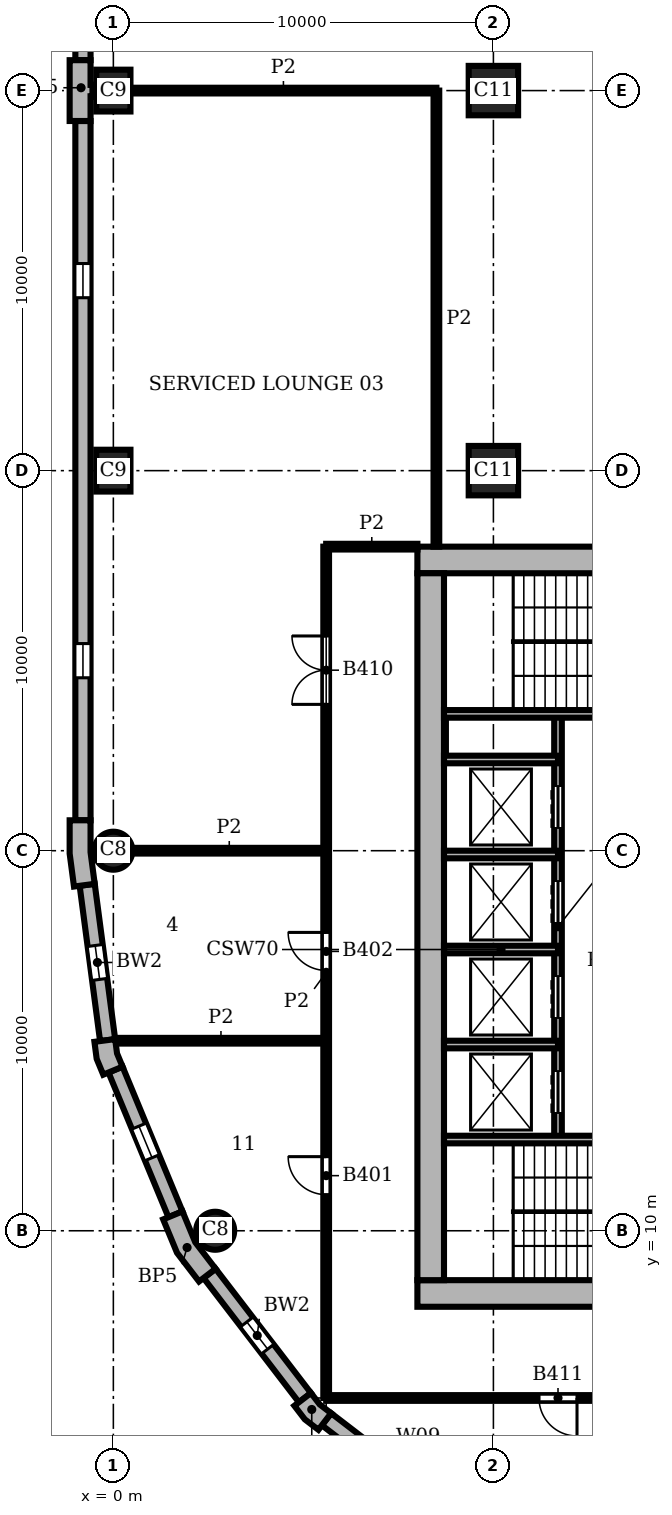
"""IFC4 building model, lengths in metres.
Left out: names, types, materials, properties, quantities, classifications, styles, units other than length and angle.
Written with IfcOpenShell. Run it as: python <this file> out.ifc"""

import sys

from ifc_helpers import new_model, si_unit, direction, frame, frame_2d, origin, origin_2d, place, context, subcontext, project, spatial, polyline, rectangle, circle, outline, extrude, element, fill, save


model = new_model("IFC4")
c1 = context("Model", 3, precision=1e-05, world=origin(), true_north=direction((0.0, 1.0)))
c2 = subcontext(c1, "Body", "Model", "MODEL_VIEW")
j1 = project(units=[si_unit("LENGTHUNIT", "METRE"), si_unit("PLANEANGLEUNIT", "RADIAN")], contexts=[c1])
p1 = place(None, origin())
s1 = spatial("IfcSite", under=j1, at=p1, CompositionType="ELEMENT")
p2 = place(p1, origin())
s2 = spatial("IfcBuilding", under=s1, at=p2, CompositionType="ELEMENT")
p3 = place(p2, frame((0.0, 0.0, 166.8)))
s3 = spatial("IfcBuildingStorey", under=s2, at=p3, CompositionType="ELEMENT", Elevation=166.8)
for number, where, z_axis, x_axis in (
    (1, (0.0, 40.0, 0.0), (0.0, 0.0, 1.0), (0.0, 1.0, 0.0)),
    (2, (0.0, 30.0, 0.0), (0.0, 0.0, 1.0), (0.0, 1.0, 0.0)),
):
    element("IfcColumn", number, at=place(p3, frame(where, z_axis=z_axis, x_axis=x_axis)), inside=s3, PredefinedType="COLUMN", context=c2, shape_type="SweptSolid", body=[
        extrude(rectangle(XDim=1.1, YDim=0.9, at=origin_2d()), origin(), (0.0, 0.0, 1.0), 3.9),
    ])
for number, where, z_axis, x_axis in (
    (3, (0.0, 20.0, 0.0), (0.0, 0.0, 1.0), (1.0, 0.0, 0.0)),
    (4, (2.679, 10.0, 0.0), (0.0, 0.0, 1.0), (1.0, 0.0, 0.0)),
):
    element("IfcColumn", number, at=place(p3, frame(where, z_axis=z_axis, x_axis=x_axis)), inside=s3, PredefinedType="COLUMN", context=c2, shape_type="SweptSolid", body=[
        extrude(circle(Radius=0.5, at=origin_2d()), origin(), (0.0, 0.0, 1.0), 3.9),
    ])
for number, where, z_axis, x_axis in (
    (5, (10.0, 30.0, 0.0), (0.0, 0.0, 1.0), (1.0, 0.0, 0.0)),
    (6, (10.0, 40.0, 0.0), (0.0, 0.0, 1.0), (1.0, 0.0, 0.0)),
):
    element("IfcColumn", number, at=place(p3, frame(where, z_axis=z_axis, x_axis=x_axis)), inside=s3, PredefinedType="COLUMN", context=c2, shape_type="SweptSolid", body=[
        extrude(rectangle(XDim=1.3, YDim=1.3, at=origin_2d()), origin(), (0.0, 0.0, 1.0), 3.9),
    ])
for number, where, z_axis, x_axis in (
    (7, (8.0, 8.35, 0.0), (0.0, 0.0, 1.0), (1.0, 0.0, 0.0)),
    (8, (28.0, 27.65, 0.0), (0.0, 0.0, 1.0), (-1.0, 0.0, 0.0)),
):
    element("IfcWall", number, at=place(p3, frame(where, z_axis=z_axis, x_axis=x_axis)), inside=s3, PredefinedType="SHEAR", context=c2, shape_type="SweptSolid", body=[
        extrude(rectangle(XDim=20.0, YDim=0.7, at=frame_2d((10.0, 0.0))), origin(), (0.0, 0.0, 1.0), 3.9),
    ])
p4 = place(p3, frame((8.35, 27.3, 0.0), z_axis=(0.0, 0.0, 1.0), x_axis=(0.0, -1.0, 0.0)))
e9 = element("IfcWall", 9, at=p4, inside=s3, PredefinedType="SHEAR", context=c2, shape_type="SweptSolid", body=[
    extrude(rectangle(XDim=18.6, YDim=0.7, at=frame_2d((9.3, 0.0))), origin(), (0.0, 0.0, 1.0), 3.9),
])
p5 = place(p3, origin())
e10 = element("IfcWall", 10, at=p5, inside=s3, PredefinedType="SOLIDWALL", context=c2, shape_type="SweptSolid", body=[
    extrude(outline(polyline([(-0.6, 39.2), (-0.6, 39.85), (-0.55, 39.85), (-0.55, 40.15), (-0.6, 40.15), (-0.6, 40.8), (-1.0, 40.8), (-1.15, 40.8), (-1.15, 40.0), (-1.15, 39.2), (-1.0, 39.2), (-0.6, 39.2)])), origin(), (0.0, 0.0, 1.0), 3.9),
])
e11 = element("IfcWall", 11, at=p5, inside=s3, PredefinedType="SOLIDWALL", context=c2, shape_type="SweptSolid", body=[
    extrude(outline(polyline([(-1.0, 20.8), (-1.15, 20.8), (-1.15, 19.925), (-1.036, 19.057), (-0.887, 19.076), (-0.49, 19.128), (-0.6, 19.961), (-0.6, 20.8), (-1.0, 20.8)])), origin(), (0.0, 0.0, 1.0), 3.9),
])
e12 = element("IfcWall", 12, at=p5, inside=s3, PredefinedType="SOLIDWALL", context=c2, shape_type="SweptSolid", body=[
    extrude(outline(polyline([(-0.349, 14.99), (-0.498, 14.971), (-0.439, 14.523), (-0.266, 14.106), (-0.128, 14.164), (0.242, 14.317), (0.097, 14.667), (0.047, 15.043), (-0.349, 14.99)])), origin(), (0.0, 0.0, 1.0), 3.9),
])
e13 = element("IfcWall", 13, at=p5, inside=s3, PredefinedType="SOLIDWALL", context=c2, shape_type="SweptSolid", body=[
    extrude(outline(polyline([(1.449, 10.356), (1.311, 10.299), (1.675, 9.42), (2.254, 8.665), (2.373, 8.757), (2.69, 9.0), (2.155, 9.698), (1.819, 10.51), (1.449, 10.356)])), origin(), (0.0, 0.0, 1.0), 3.9),
])
e14 = element("IfcWall", 14, at=p5, inside=s3, PredefinedType="SOLIDWALL", context=c2, shape_type="SweptSolid", body=[
    extrude(outline(polyline([(4.882, 5.487), (4.763, 5.396), (5.038, 5.038), (5.396, 4.763), (5.487, 4.882), (5.731, 5.199), (5.43, 5.43), (5.199, 5.731), (4.882, 5.487)])), origin(), (0.0, 0.0, 1.0), 3.9),
])
p6 = place(p3, frame((-0.8, 59.2, 0.0), z_axis=(0.0, 0.0, 1.0), x_axis=(0.0, -1.0, 0.0)))
e15 = element("IfcWall", 15, at=p6, inside=s3, PredefinedType="SOLIDWALL", context=c2, shape_type="SweptSolid", body=[
    extrude(rectangle(XDim=18.4, YDim=0.4, at=frame_2d((9.2, 0.0))), origin(), (0.0, 0.0, 1.0), 3.9),
])
p7 = place(p6, frame((3.75, 0.0, 0.9)))
e16 = element("IfcOpeningElement", 16, at=p7, cuts=e15, PredefinedType="OPENING", context=c2, shape_type="SweptSolid", body=[
    extrude(rectangle(XDim=0.9, YDim=2.35, at=frame_2d((0.45, 1.175))), frame((0.0, 0.21, 0.0), z_axis=(0.0, -1.0, 0.0), x_axis=(1.0, 0.0, 0.0)), (0.0, 0.0, 1.0), 0.42),
])
p8 = place(p6, frame((13.75, 0.0, 0.9)))
e17 = element("IfcOpeningElement", 17, at=p8, cuts=e15, PredefinedType="OPENING", context=c2, shape_type="SweptSolid", body=[
    extrude(rectangle(XDim=0.9, YDim=2.35, at=frame_2d((0.45, 1.175))), frame((0.0, 0.21, 0.0), z_axis=(0.0, -1.0, 0.0), x_axis=(1.0, 0.0, 0.0)), (0.0, 0.0, 1.0), 0.42),
])
p9 = place(p3, frame((-0.8, 39.2, 0.0), z_axis=(0.0, 0.0, 1.0), x_axis=(0.0, -1.0, 0.0)))
e18 = element("IfcWall", 18, at=p9, inside=s3, PredefinedType="SOLIDWALL", context=c2, shape_type="SweptSolid", body=[
    extrude(rectangle(XDim=18.4, YDim=0.4, at=frame_2d((9.2, 0.0))), origin(), (0.0, 0.0, 1.0), 3.9),
])
p10 = place(p9, frame((3.75, 0.0, 0.9)))
e19 = element("IfcOpeningElement", 19, at=p10, cuts=e18, PredefinedType="OPENING", context=c2, shape_type="SweptSolid", body=[
    extrude(rectangle(XDim=0.9, YDim=2.35, at=frame_2d((0.45, 1.175))), frame((0.0, 0.21, 0.0), z_axis=(0.0, -1.0, 0.0), x_axis=(1.0, 0.0, 0.0)), (0.0, 0.0, 1.0), 0.42),
])
p11 = place(p9, frame((13.75, 0.0, 0.9)))
e20 = element("IfcOpeningElement", 20, at=p11, cuts=e18, PredefinedType="OPENING", context=c2, shape_type="SweptSolid", body=[
    extrude(rectangle(XDim=0.9, YDim=2.35, at=frame_2d((0.45, 1.175))), frame((0.0, 0.21, 0.0), z_axis=(0.0, -1.0, 0.0), x_axis=(1.0, 0.0, 0.0)), (0.0, 0.0, 1.0), 0.42),
])
p12 = place(p3, frame((-0.689, 19.102, 0.0), z_axis=(0.0, 0.0, 1.0), x_axis=(0.130514280502, -0.991446429508, 0.0)))
e21 = element("IfcWall", 21, at=p12, inside=s3, PredefinedType="SOLIDWALL", context=c2, shape_type="SweptSolid", body=[
    extrude(rectangle(XDim=4.121, YDim=0.4, at=frame_2d((2.061, 0.0))), origin(), (0.0, 0.0, 1.0), 3.9),
])
p13 = place(p12, frame((1.611, 0.0, 0.9)))
e22 = element("IfcOpeningElement", 22, at=p13, cuts=e21, PredefinedType="OPENING", context=c2, shape_type="SweptSolid", body=[
    extrude(rectangle(XDim=0.9, YDim=2.35, at=frame_2d((0.45, 1.175))), frame((0.0, 0.21, 0.0), z_axis=(0.0, -1.0, 0.0), x_axis=(1.0, 0.0, 0.0)), (0.0, 0.0, 1.0), 0.42),
])
p14 = place(p3, frame((0.057, 14.24, 0.0), z_axis=(0.0, 0.0, 1.0), x_axis=(0.382721546029, -0.923863744394, 0.0)))
e23 = element("IfcWall", 23, at=p14, inside=s3, PredefinedType="SOLIDWALL", context=c2, shape_type="SweptSolid", body=[
    extrude(rectangle(XDim=4.121, YDim=0.4, at=frame_2d((2.061, 0.0))), origin(), (0.0, 0.0, 1.0), 3.9),
])
p15 = place(p14, frame((1.611, 0.0, 0.9)))
e24 = element("IfcOpeningElement", 24, at=p15, cuts=e23, PredefinedType="OPENING", context=c2, shape_type="SweptSolid", body=[
    extrude(rectangle(XDim=0.9, YDim=2.35, at=frame_2d((0.45, 1.175))), frame((0.0, 0.21, 0.0), z_axis=(0.0, -1.0, 0.0), x_axis=(1.0, 0.0, 0.0)), (0.0, 0.0, 1.0), 0.42),
])
p16 = place(p3, frame((2.532, 8.878, 0.0), z_axis=(0.0, 0.0, 1.0), x_axis=(0.608759824817, -0.793354571229, 0.0)))
e25 = element("IfcWall", 25, at=p16, inside=s3, PredefinedType="SOLIDWALL", context=c2, shape_type="SweptSolid", body=[
    extrude(rectangle(XDim=4.121, YDim=0.4, at=frame_2d((2.061, 0.0))), origin(), (0.0, 0.0, 1.0), 3.9),
])
p17 = place(p16, frame((1.611, 0.0, 0.9)))
e26 = element("IfcOpeningElement", 26, at=p17, cuts=e25, PredefinedType="OPENING", context=c2, shape_type="SweptSolid", body=[
    extrude(rectangle(XDim=0.9, YDim=2.35, at=frame_2d((0.45, 1.175))), frame((0.0, 0.21, 0.0), z_axis=(0.0, -1.0, 0.0), x_axis=(1.0, 0.0, 0.0)), (0.0, 0.0, 1.0), 0.42),
])
p18 = place(p3, frame((5.609, 5.041, 0.0), z_axis=(0.0, 0.0, 1.0), x_axis=(0.793354571229, -0.608759824817, 0.0)))
e27 = element("IfcWall", 27, at=p18, inside=s3, PredefinedType="SOLIDWALL", context=c2, shape_type="SweptSolid", body=[
    extrude(rectangle(XDim=4.121, YDim=0.4, at=frame_2d((2.061, 0.0))), origin(), (0.0, 0.0, 1.0), 3.9),
])
p19 = place(p18, frame((1.611, 0.0, 0.9)))
e28 = element("IfcOpeningElement", 28, at=p19, cuts=e27, PredefinedType="OPENING", context=c2, shape_type="SweptSolid", body=[
    extrude(rectangle(XDim=0.9, YDim=2.35, at=frame_2d((0.45, 1.175))), frame((0.0, 0.21, 0.0), z_axis=(0.0, -1.0, 0.0), x_axis=(1.0, 0.0, 0.0)), (0.0, 0.0, 1.0), 0.42),
])
p20 = place(p3, frame((8.7, 12.4, 0.0), z_axis=(0.0, 0.0, 1.0), x_axis=(1.0, 0.0, 0.0)))
e29 = element("IfcWall", 29, at=p20, inside=s3, PredefinedType="SHEAR", context=c2, shape_type="SweptSolid", body=[
    extrude(rectangle(XDim=5.1, YDim=0.2, at=frame_2d((2.55, 0.0))), origin(), (0.0, 0.0, 1.0), 3.58),
])
for number, where, z_axis, x_axis in (
    (30, (8.7, 14.9, 0.0), (0.0, 0.0, 1.0), (1.0, 0.0, 0.0)),
    (31, (8.7, 17.4, 0.0), (0.0, 0.0, 1.0), (1.0, 0.0, 0.0)),
    (32, (8.7, 19.9, 0.0), (0.0, 0.0, 1.0), (1.0, 0.0, 0.0)),
    (33, (8.7, 22.4, 0.0), (0.0, 0.0, 1.0), (1.0, 0.0, 0.0)),
):
    element("IfcWall", number, at=place(p3, frame(where, z_axis=z_axis, x_axis=x_axis)), inside=s3, PredefinedType="SHEAR", context=c2, shape_type="SweptSolid", body=[
        extrude(rectangle(XDim=3.0, YDim=0.2, at=frame_2d((1.5, 0.0))), origin(), (0.0, 0.0, 1.0), 3.58),
    ])
p21 = place(p3, frame((8.7, 23.6, 0.0), z_axis=(0.0, 0.0, 1.0), x_axis=(1.0, 0.0, 0.0)))
e34 = element("IfcWall", 34, at=p21, inside=s3, PredefinedType="SHEAR", context=c2, shape_type="SweptSolid", body=[
    extrude(rectangle(XDim=5.1, YDim=0.2, at=frame_2d((2.55, 0.0))), origin(), (0.0, 0.0, 1.0), 3.58),
])
p22 = place(p3, frame((11.7, 12.4, 0.0), z_axis=(0.0, 0.0, 1.0), x_axis=(0.0, 1.0, 0.0)))
e35 = element("IfcWall", 35, at=p22, inside=s3, PredefinedType="SHEAR", context=c2, shape_type="SweptSolid", body=[
    extrude(rectangle(XDim=11.2, YDim=0.2, at=frame_2d((5.6, 0.0))), origin(), (0.0, 0.0, 1.0), 3.58),
])
p23 = place(p22, frame((0.7, 0.0, 0.0)))
e36 = element("IfcOpeningElement", 36, at=p23, cuts=e35, PredefinedType="OPENING", context=c2, shape_type="SweptSolid", body=[
    extrude(rectangle(XDim=1.1, YDim=2.1, at=frame_2d((0.55, 1.05))), frame((0.0, 0.11, 0.0), z_axis=(0.0, -1.0, 0.0), x_axis=(1.0, 0.0, 0.0)), (0.0, 0.0, 1.0), 0.22),
])
p24 = place(p22, frame((3.2, 0.0, 0.0)))
e37 = element("IfcOpeningElement", 37, at=p24, cuts=e35, PredefinedType="OPENING", context=c2, shape_type="SweptSolid", body=[
    extrude(rectangle(XDim=1.1, YDim=2.1, at=frame_2d((0.55, 1.05))), frame((0.0, 0.11, 0.0), z_axis=(0.0, -1.0, 0.0), x_axis=(1.0, 0.0, 0.0)), (0.0, 0.0, 1.0), 0.22),
])
p25 = place(p22, frame((5.7, 0.0, 0.0)))
e38 = element("IfcOpeningElement", 38, at=p25, cuts=e35, PredefinedType="OPENING", context=c2, shape_type="SweptSolid", body=[
    extrude(rectangle(XDim=1.1, YDim=2.1, at=frame_2d((0.55, 1.05))), frame((0.0, 0.11, 0.0), z_axis=(0.0, -1.0, 0.0), x_axis=(1.0, 0.0, 0.0)), (0.0, 0.0, 1.0), 0.22),
])
p26 = place(p22, frame((8.2, 0.0, 0.0)))
e39 = element("IfcOpeningElement", 39, at=p26, cuts=e35, PredefinedType="OPENING", context=c2, shape_type="SweptSolid", body=[
    extrude(rectangle(XDim=1.1, YDim=2.1, at=frame_2d((0.55, 1.05))), frame((0.0, 0.11, 0.0), z_axis=(0.0, -1.0, 0.0), x_axis=(1.0, 0.0, 0.0)), (0.0, 0.0, 1.0), 0.22),
])
p27 = place(p3, frame((5.6, 5.6, 0.0), z_axis=(0.0, 0.0, 1.0), x_axis=(0.0, 1.0, 0.0)))
e40 = element("IfcWall", 40, at=p27, inside=s3, PredefinedType="PARTITIONING", context=c2, shape_type="SweptSolid", body=[
    extrude(rectangle(XDim=22.4, YDim=0.15, at=frame_2d((11.2, 0.0))), origin(), (0.0, 0.0, 1.0), 3.58),
])
p28 = place(p27, frame((5.35, 0.0, 0.0)))
e41 = element("IfcOpeningElement", 41, at=p28, cuts=e40, PredefinedType="OPENING", context=c2, shape_type="SweptSolid", body=[
    extrude(rectangle(XDim=1.0, YDim=2.1, at=frame_2d((0.5, 1.05))), frame((0.0, 0.085, 0.0), z_axis=(0.0, -1.0, 0.0), x_axis=(1.0, 0.0, 0.0)), (0.0, 0.0, 1.0), 0.17),
])
p29 = place(p27, frame((11.25, 0.0, 0.0)))
e42 = element("IfcOpeningElement", 42, at=p29, cuts=e40, PredefinedType="OPENING", context=c2, shape_type="SweptSolid", body=[
    extrude(rectangle(XDim=1.0, YDim=2.1, at=frame_2d((0.5, 1.05))), frame((0.0, 0.085, 0.0), z_axis=(0.0, -1.0, 0.0), x_axis=(1.0, 0.0, 0.0)), (0.0, 0.0, 1.0), 0.17),
])
p30 = place(p27, frame((18.25, 0.0, 0.0)))
e43 = element("IfcOpeningElement", 43, at=p30, cuts=e40, PredefinedType="OPENING", context=c2, shape_type="SweptSolid", body=[
    extrude(rectangle(XDim=1.8, YDim=2.1, at=frame_2d((0.9, 1.05))), frame((0.0, 0.085, 0.0), z_axis=(0.0, -1.0, 0.0), x_axis=(1.0, 0.0, 0.0)), (0.0, 0.0, 1.0), 0.17),
])
p31 = place(p3, frame((8.5, 28.0, 0.0), z_axis=(0.0, 0.0, 1.0), x_axis=(0.0, 1.0, 0.0)))
e44 = element("IfcWall", 44, at=p31, inside=s3, PredefinedType="PARTITIONING", context=c2, shape_type="SweptSolid", body=[
    extrude(rectangle(XDim=12.0, YDim=0.15, at=frame_2d((6.0, 0.0))), origin(), (0.0, 0.0, 1.0), 3.58),
])
p32 = place(p3, frame((5.6, 5.6, 0.0), z_axis=(0.0, 0.0, 1.0), x_axis=(1.0, 0.0, 0.0)))
e45 = element("IfcWall", 45, at=p32, inside=s3, PredefinedType="PARTITIONING", context=c2, shape_type="SweptSolid", body=[
    extrude(rectangle(XDim=25.4, YDim=0.15, at=frame_2d((12.7, 0.0))), origin(), (0.0, 0.0, 1.0), 3.58),
])
p33 = place(p32, frame((5.6, 0.0, 0.0)))
e46 = element("IfcOpeningElement", 46, at=p33, cuts=e45, PredefinedType="OPENING", context=c2, shape_type="SweptSolid", body=[
    extrude(rectangle(XDim=1.0, YDim=2.1, at=frame_2d((0.5, 1.05))), frame((0.0, 0.085, 0.0), z_axis=(0.0, -1.0, 0.0), x_axis=(1.0, 0.0, 0.0)), (0.0, 0.0, 1.0), 0.17),
])
p34 = place(p32, frame((11.0, 0.0, 0.0)))
e47 = element("IfcOpeningElement", 47, at=p34, cuts=e45, PredefinedType="OPENING", context=c2, shape_type="SweptSolid", body=[
    extrude(rectangle(XDim=1.0, YDim=2.1, at=frame_2d((0.5, 1.05))), frame((0.0, 0.085, 0.0), z_axis=(0.0, -1.0, 0.0), x_axis=(1.0, 0.0, 0.0)), (0.0, 0.0, 1.0), 0.17),
])
p35 = place(p32, frame((18.75, 0.0, 0.0)))
e48 = element("IfcOpeningElement", 48, at=p35, cuts=e45, PredefinedType="OPENING", context=c2, shape_type="SweptSolid", body=[
    extrude(rectangle(XDim=1.0, YDim=2.1, at=frame_2d((0.5, 1.05))), frame((0.0, 0.085, 0.0), z_axis=(0.0, -1.0, 0.0), x_axis=(1.0, 0.0, 0.0)), (0.0, 0.0, 1.0), 0.17),
])
p36 = place(p3, frame((0.063, 15.0, 0.0), z_axis=(0.0, 0.0, 1.0), x_axis=(1.0, 0.0, 0.0)))
e49 = element("IfcWall", 49, at=p36, inside=s3, PredefinedType="PARTITIONING", context=c2, shape_type="SweptSolid", body=[
    extrude(rectangle(XDim=5.537, YDim=0.15, at=frame_2d((2.769, 0.0))), origin(), (0.0, 0.0, 1.0), 3.58),
])
p37 = place(p3, frame((0.5, 20.0, 0.0), z_axis=(0.0, 0.0, 1.0), x_axis=(1.0, 0.0, 0.0)))
e50 = element("IfcWall", 50, at=p37, inside=s3, PredefinedType="PARTITIONING", context=c2, shape_type="SweptSolid", body=[
    extrude(rectangle(XDim=5.1, YDim=0.15, at=frame_2d((2.55, 0.0))), origin(), (0.0, 0.0, 1.0), 3.58),
])
p38 = place(p3, frame((5.6, 28.0, 0.0), z_axis=(0.0, 0.0, 1.0), x_axis=(1.0, 0.0, 0.0)))
e51 = element("IfcWall", 51, at=p38, inside=s3, PredefinedType="PARTITIONING", context=c2, shape_type="SweptSolid", body=[
    extrude(rectangle(XDim=2.4, YDim=0.15, at=frame_2d((1.2, 0.0))), origin(), (0.0, 0.0, 1.0), 3.58),
])
p39 = place(p3, frame((0.45, 40.0, 0.0), z_axis=(0.0, 0.0, 1.0), x_axis=(1.0, 0.0, 0.0)))
e52 = element("IfcWall", 52, at=p39, inside=s3, PredefinedType="PARTITIONING", context=c2, shape_type="SweptSolid", body=[
    extrude(rectangle(XDim=8.05, YDim=0.15, at=frame_2d((4.025, 0.0))), origin(), (0.0, 0.0, 1.0), 3.58),
])
p40 = place(p10, origin())
e53 = element("IfcWindow", 53, at=p40, inside=s3, PartitioningType="SINGLE_PANEL", PredefinedType="WINDOW", context=c2, shape_type="SweptSolid", body=[
    extrude(rectangle(XDim=0.9, YDim=2.35, at=frame_2d((0.45, 1.175))), frame((0.0, 0.16, 0.0), z_axis=(0.0, -1.0, 0.0), x_axis=(1.0, 0.0, 0.0)), (0.0, 0.0, 1.0), 0.06),
])
fill(e19, e53)
p41 = place(p11, origin())
e54 = element("IfcWindow", 54, at=p41, inside=s3, PartitioningType="SINGLE_PANEL", PredefinedType="WINDOW", context=c2, shape_type="SweptSolid", body=[
    extrude(rectangle(XDim=0.9, YDim=2.35, at=frame_2d((0.45, 1.175))), frame((0.0, 0.16, 0.0), z_axis=(0.0, -1.0, 0.0), x_axis=(1.0, 0.0, 0.0)), (0.0, 0.0, 1.0), 0.06),
])
fill(e20, e54)
p42 = place(p13, origin())
e55 = element("IfcWindow", 55, at=p42, inside=s3, PartitioningType="SINGLE_PANEL", PredefinedType="WINDOW", context=c2, shape_type="SweptSolid", body=[
    extrude(rectangle(XDim=0.9, YDim=2.35, at=frame_2d((0.45, 1.175))), frame((0.0, 0.16, 0.0), z_axis=(0.0, -1.0, 0.0), x_axis=(1.0, 0.0, 0.0)), (0.0, 0.0, 1.0), 0.06),
])
fill(e22, e55)
p43 = place(p15, origin())
e56 = element("IfcWindow", 56, at=p43, inside=s3, PartitioningType="SINGLE_PANEL", PredefinedType="WINDOW", context=c2, shape_type="SweptSolid", body=[
    extrude(rectangle(XDim=0.9, YDim=2.35, at=frame_2d((0.45, 1.175))), frame((0.0, 0.16, 0.0), z_axis=(0.0, -1.0, 0.0), x_axis=(1.0, 0.0, 0.0)), (0.0, 0.0, 1.0), 0.06),
])
fill(e24, e56)
p44 = place(p17, origin())
e57 = element("IfcWindow", 57, at=p44, inside=s3, PartitioningType="SINGLE_PANEL", PredefinedType="WINDOW", context=c2, shape_type="SweptSolid", body=[
    extrude(rectangle(XDim=0.9, YDim=2.35, at=frame_2d((0.45, 1.175))), frame((0.0, 0.16, 0.0), z_axis=(0.0, -1.0, 0.0), x_axis=(1.0, 0.0, 0.0)), (0.0, 0.0, 1.0), 0.06),
])
fill(e26, e57)
p45 = place(p23, origin())
e58 = element("IfcDoor", 58, at=p45, inside=s3, OperationType="DOUBLE_DOOR_SLIDING", PredefinedType="DOOR", context=c2, shape_type="SweptSolid", body=[
    extrude(rectangle(XDim=1.1, YDim=2.1, at=frame_2d((0.55, 1.05))), frame((0.0, 0.025, 0.0), z_axis=(0.0, -1.0, 0.0), x_axis=(1.0, 0.0, 0.0)), (0.0, 0.0, 1.0), 0.05),
])
fill(e36, e58)
p46 = place(p24, origin())
e59 = element("IfcDoor", 59, at=p46, inside=s3, OperationType="DOUBLE_DOOR_SLIDING", PredefinedType="DOOR", context=c2, shape_type="SweptSolid", body=[
    extrude(rectangle(XDim=1.1, YDim=2.1, at=frame_2d((0.55, 1.05))), frame((0.0, 0.025, 0.0), z_axis=(0.0, -1.0, 0.0), x_axis=(1.0, 0.0, 0.0)), (0.0, 0.0, 1.0), 0.05),
])
fill(e37, e59)
p47 = place(p25, origin())
e60 = element("IfcDoor", 60, at=p47, inside=s3, OperationType="DOUBLE_DOOR_SLIDING", PredefinedType="DOOR", context=c2, shape_type="SweptSolid", body=[
    extrude(rectangle(XDim=1.1, YDim=2.1, at=frame_2d((0.55, 1.05))), frame((0.0, 0.025, 0.0), z_axis=(0.0, -1.0, 0.0), x_axis=(1.0, 0.0, 0.0)), (0.0, 0.0, 1.0), 0.05),
])
fill(e38, e60)
p48 = place(p26, origin())
e61 = element("IfcDoor", 61, at=p48, inside=s3, OperationType="DOUBLE_DOOR_SLIDING", PredefinedType="DOOR", context=c2, shape_type="SweptSolid", body=[
    extrude(rectangle(XDim=1.1, YDim=2.1, at=frame_2d((0.55, 1.05))), frame((0.0, 0.025, 0.0), z_axis=(0.0, -1.0, 0.0), x_axis=(1.0, 0.0, 0.0)), (0.0, 0.0, 1.0), 0.05),
])
fill(e39, e61)
p49 = place(p28, origin())
e62 = element("IfcDoor", 62, at=p49, inside=s3, OperationType="SINGLE_SWING_RIGHT", PredefinedType="DOOR", context=c2, shape_type="SweptSolid", body=[
    extrude(rectangle(XDim=1.0, YDim=2.1, at=frame_2d((0.5, 1.05))), frame((0.0, 0.025, 0.0), z_axis=(0.0, -1.0, 0.0), x_axis=(1.0, 0.0, 0.0)), (0.0, 0.0, 1.0), 0.05),
])
fill(e41, e62)
p50 = place(p29, origin())
e63 = element("IfcDoor", 63, at=p50, inside=s3, OperationType="SINGLE_SWING_RIGHT", PredefinedType="DOOR", context=c2, shape_type="SweptSolid", body=[
    extrude(rectangle(XDim=1.0, YDim=2.1, at=frame_2d((0.5, 1.05))), frame((0.0, 0.025, 0.0), z_axis=(0.0, -1.0, 0.0), x_axis=(1.0, 0.0, 0.0)), (0.0, 0.0, 1.0), 0.05),
])
fill(e42, e63)
p51 = place(p30, origin())
e64 = element("IfcDoor", 64, at=p51, inside=s3, OperationType="DOUBLE_DOOR_SINGLE_SWING", PredefinedType="DOOR", context=c2, shape_type="SweptSolid", body=[
    extrude(rectangle(XDim=1.8, YDim=2.1, at=frame_2d((0.9, 1.05))), frame((0.0, 0.025, 0.0), z_axis=(0.0, -1.0, 0.0), x_axis=(1.0, 0.0, 0.0)), (0.0, 0.0, 1.0), 0.05),
])
fill(e43, e64)
p52 = place(p33, frame((1.0, 0.0, 0.0), z_axis=(0.0, 0.0, 1.0), x_axis=(-1.0, 0.0, 0.0)))
e65 = element("IfcDoor", 65, at=p52, inside=s3, OperationType="SINGLE_SWING_LEFT", PredefinedType="DOOR", context=c2, shape_type="SweptSolid", body=[
    extrude(rectangle(XDim=1.0, YDim=2.1, at=frame_2d((0.5, 1.05))), frame((0.0, 0.025, 0.0), z_axis=(0.0, -1.0, 0.0), x_axis=(1.0, 0.0, 0.0)), (0.0, 0.0, 1.0), 0.05),
])
fill(e46, e65)
save(model, sys.argv[1])
